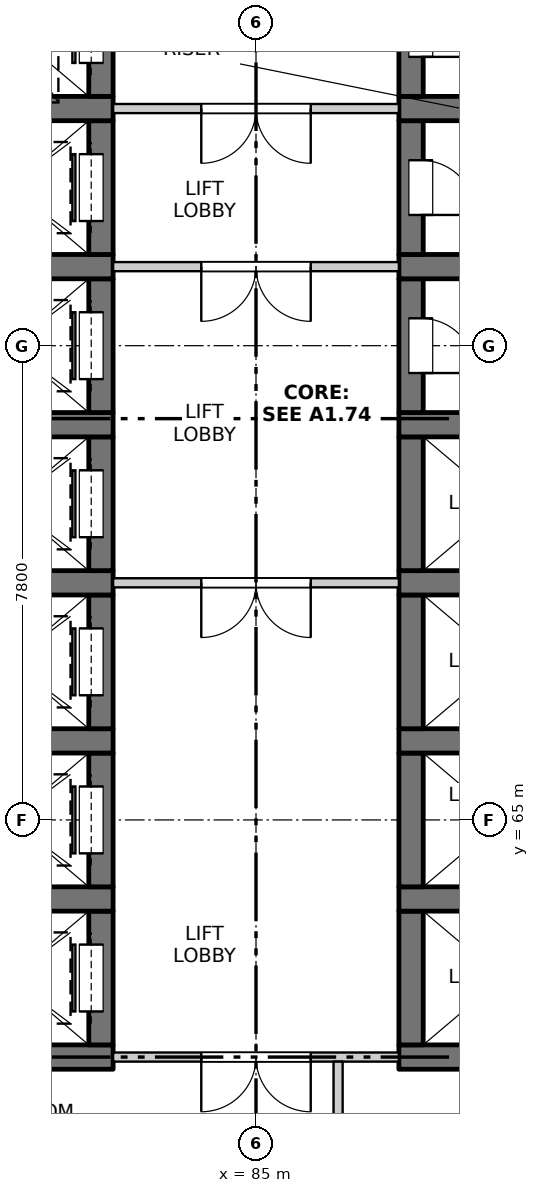
"""IFC4 building model, lengths in metres.
Left out: names, types, materials, properties, quantities, classifications, styles, units other than length and angle.
Written with IfcOpenShell. Run it as: python <this file> out.ifc"""

import sys

from ifc_helpers import new_model, si_unit, direction, frame, frame_2d, origin, place, context, subcontext, project, spatial, rectangle, extrude, element, fill, save


model = new_model("IFC4")
c1 = context("Model", 3, precision=1e-05, world=origin(), true_north=direction((0.0, 1.0)))
c2 = subcontext(c1, "Body", "Model", "MODEL_VIEW")
j1 = project(units=[si_unit("LENGTHUNIT", "METRE"), si_unit("PLANEANGLEUNIT", "RADIAN")], contexts=[c1])
p1 = place(None, origin())
s1 = spatial("IfcSite", under=j1, at=p1, CompositionType="ELEMENT")
p2 = place(p1, origin())
s2 = spatial("IfcBuilding", under=s1, at=p2, CompositionType="ELEMENT")
p3 = place(p2, frame((0.0, 0.0, 29.7)))
s3 = spatial("IfcBuildingStorey", under=s2, at=p3, CompositionType="ELEMENT", Elevation=29.7)
p4 = place(p3, frame((79.65, 61.1, -0.25), z_axis=(0.0, 0.0, 1.0), x_axis=(1.0, 0.0, 0.0)))
e1 = element("IfcWall", 1, at=p4, inside=s3, PredefinedType="SOLIDWALL", context=c2, shape_type="SweptSolid", body=[
    extrude(rectangle(XDim=3.0, YDim=0.4, at=frame_2d((1.5, 0.0))), origin(), (0.0, 0.0, 1.0), 3.4),
])
p5 = place(p3, frame((82.45, 61.3, -0.25), z_axis=(0.0, 0.0, 1.0), x_axis=(0.0, 1.0, 0.0)))
e2 = element("IfcWall", 2, at=p5, inside=s3, PredefinedType="SOLIDWALL", context=c2, shape_type="SweptSolid", body=[
    extrude(rectangle(XDim=2.2, YDim=0.4, at=frame_2d((1.1, 0.0))), origin(), (0.0, 0.0, 1.0), 3.4),
])
p6 = place(p5, frame((0.55, 0.0, 0.25)))
e3 = element("IfcOpeningElement", 3, at=p6, cuts=e2, PredefinedType="OPENING", context=c2, shape_type="SweptSolid", body=[
    extrude(rectangle(XDim=1.1, YDim=2.1, at=frame_2d((0.55, 1.05))), frame((0.0, 0.21, 0.0), z_axis=(0.0, -1.0, 0.0), x_axis=(1.0, 0.0, 0.0)), (0.0, 0.0, 1.0), 0.42),
])
p7 = place(p3, frame((79.65, 63.7, -0.25), z_axis=(0.0, 0.0, 1.0), x_axis=(1.0, 0.0, 0.0)))
e4 = element("IfcWall", 4, at=p7, inside=s3, PredefinedType="SOLIDWALL", context=c2, shape_type="SweptSolid", body=[
    extrude(rectangle(XDim=3.0, YDim=0.4, at=frame_2d((1.5, 0.0))), origin(), (0.0, 0.0, 1.0), 3.4),
])
p8 = place(p3, frame((82.45, 63.9, -0.25), z_axis=(0.0, 0.0, 1.0), x_axis=(0.0, 1.0, 0.0)))
e5 = element("IfcWall", 5, at=p8, inside=s3, PredefinedType="SOLIDWALL", context=c2, shape_type="SweptSolid", body=[
    extrude(rectangle(XDim=2.2, YDim=0.4, at=frame_2d((1.1, 0.0))), origin(), (0.0, 0.0, 1.0), 3.4),
])
p9 = place(p8, frame((0.55, 0.0, 0.25)))
e6 = element("IfcOpeningElement", 6, at=p9, cuts=e5, PredefinedType="OPENING", context=c2, shape_type="SweptSolid", body=[
    extrude(rectangle(XDim=1.1, YDim=2.1, at=frame_2d((0.55, 1.05))), frame((0.0, 0.21, 0.0), z_axis=(0.0, -1.0, 0.0), x_axis=(1.0, 0.0, 0.0)), (0.0, 0.0, 1.0), 0.42),
])
p10 = place(p3, frame((79.65, 66.3, -0.25), z_axis=(0.0, 0.0, 1.0), x_axis=(1.0, 0.0, 0.0)))
e7 = element("IfcWall", 7, at=p10, inside=s3, PredefinedType="SOLIDWALL", context=c2, shape_type="SweptSolid", body=[
    extrude(rectangle(XDim=3.0, YDim=0.4, at=frame_2d((1.5, 0.0))), origin(), (0.0, 0.0, 1.0), 3.4),
])
p11 = place(p3, frame((82.45, 66.5, -0.25), z_axis=(0.0, 0.0, 1.0), x_axis=(0.0, 1.0, 0.0)))
e8 = element("IfcWall", 8, at=p11, inside=s3, PredefinedType="SOLIDWALL", context=c2, shape_type="SweptSolid", body=[
    extrude(rectangle(XDim=2.2, YDim=0.4, at=frame_2d((1.1, 0.0))), origin(), (0.0, 0.0, 1.0), 3.4),
])
p12 = place(p11, frame((0.55, 0.0, 0.25)))
e9 = element("IfcOpeningElement", 9, at=p12, cuts=e8, PredefinedType="OPENING", context=c2, shape_type="SweptSolid", body=[
    extrude(rectangle(XDim=1.1, YDim=2.1, at=frame_2d((0.55, 1.05))), frame((0.0, 0.21, 0.0), z_axis=(0.0, -1.0, 0.0), x_axis=(1.0, 0.0, 0.0)), (0.0, 0.0, 1.0), 0.42),
])
p13 = place(p3, frame((79.65, 68.9, -0.25), z_axis=(0.0, 0.0, 1.0), x_axis=(1.0, 0.0, 0.0)))
e10 = element("IfcWall", 10, at=p13, inside=s3, PredefinedType="SOLIDWALL", context=c2, shape_type="SweptSolid", body=[
    extrude(rectangle(XDim=3.0, YDim=0.4, at=frame_2d((1.5, 0.0))), origin(), (0.0, 0.0, 1.0), 3.4),
])
p14 = place(p3, frame((82.45, 69.1, -0.25), z_axis=(0.0, 0.0, 1.0), x_axis=(0.0, 1.0, 0.0)))
e11 = element("IfcWall", 11, at=p14, inside=s3, PredefinedType="SOLIDWALL", context=c2, shape_type="SweptSolid", body=[
    extrude(rectangle(XDim=2.2, YDim=0.4, at=frame_2d((1.1, 0.0))), origin(), (0.0, 0.0, 1.0), 3.4),
])
p15 = place(p14, frame((0.55, 0.0, 0.25)))
e12 = element("IfcOpeningElement", 12, at=p15, cuts=e11, PredefinedType="OPENING", context=c2, shape_type="SweptSolid", body=[
    extrude(rectangle(XDim=1.1, YDim=2.1, at=frame_2d((0.55, 1.05))), frame((0.0, 0.21, 0.0), z_axis=(0.0, -1.0, 0.0), x_axis=(1.0, 0.0, 0.0)), (0.0, 0.0, 1.0), 0.42),
])
p16 = place(p3, frame((79.65, 71.5, -0.25), z_axis=(0.0, 0.0, 1.0), x_axis=(1.0, 0.0, 0.0)))
e13 = element("IfcWall", 13, at=p16, inside=s3, PredefinedType="SOLIDWALL", context=c2, shape_type="SweptSolid", body=[
    extrude(rectangle(XDim=3.0, YDim=0.4, at=frame_2d((1.5, 0.0))), origin(), (0.0, 0.0, 1.0), 3.4),
])
p17 = place(p3, frame((82.45, 71.7, -0.25), z_axis=(0.0, 0.0, 1.0), x_axis=(0.0, 1.0, 0.0)))
e14 = element("IfcWall", 14, at=p17, inside=s3, PredefinedType="SOLIDWALL", context=c2, shape_type="SweptSolid", body=[
    extrude(rectangle(XDim=2.2, YDim=0.4, at=frame_2d((1.1, 0.0))), origin(), (0.0, 0.0, 1.0), 3.4),
])
p18 = place(p17, frame((0.55, 0.0, 0.25)))
e15 = element("IfcOpeningElement", 15, at=p18, cuts=e14, PredefinedType="OPENING", context=c2, shape_type="SweptSolid", body=[
    extrude(rectangle(XDim=1.1, YDim=2.1, at=frame_2d((0.55, 1.05))), frame((0.0, 0.21, 0.0), z_axis=(0.0, -1.0, 0.0), x_axis=(1.0, 0.0, 0.0)), (0.0, 0.0, 1.0), 0.42),
])
p19 = place(p3, frame((79.65, 74.1, -0.25), z_axis=(0.0, 0.0, 1.0), x_axis=(1.0, 0.0, 0.0)))
e16 = element("IfcWall", 16, at=p19, inside=s3, PredefinedType="SOLIDWALL", context=c2, shape_type="SweptSolid", body=[
    extrude(rectangle(XDim=3.0, YDim=0.4, at=frame_2d((1.5, 0.0))), origin(), (0.0, 0.0, 1.0), 3.4),
])
p20 = place(p3, frame((82.45, 74.3, -0.25), z_axis=(0.0, 0.0, 1.0), x_axis=(0.0, 1.0, 0.0)))
e17 = element("IfcWall", 17, at=p20, inside=s3, PredefinedType="SOLIDWALL", context=c2, shape_type="SweptSolid", body=[
    extrude(rectangle(XDim=2.2, YDim=0.4, at=frame_2d((1.1, 0.0))), origin(), (0.0, 0.0, 1.0), 3.4),
])
p21 = place(p20, frame((0.55, 0.0, 0.25)))
e18 = element("IfcOpeningElement", 18, at=p21, cuts=e17, PredefinedType="OPENING", context=c2, shape_type="SweptSolid", body=[
    extrude(rectangle(XDim=1.1, YDim=2.1, at=frame_2d((0.55, 1.05))), frame((0.0, 0.21, 0.0), z_axis=(0.0, -1.0, 0.0), x_axis=(1.0, 0.0, 0.0)), (0.0, 0.0, 1.0), 0.42),
])
p22 = place(p3, frame((79.65, 76.7, -0.25), z_axis=(0.0, 0.0, 1.0), x_axis=(1.0, 0.0, 0.0)))
e19 = element("IfcWall", 19, at=p22, inside=s3, PredefinedType="SOLIDWALL", context=c2, shape_type="SweptSolid", body=[
    extrude(rectangle(XDim=3.0, YDim=0.4, at=frame_2d((1.5, 0.0))), origin(), (0.0, 0.0, 1.0), 3.4),
])
p23 = place(p3, frame((82.45, 76.9, -0.25), z_axis=(0.0, 0.0, 1.0), x_axis=(0.0, 1.0, 0.0)))
e20 = element("IfcWall", 20, at=p23, inside=s3, PredefinedType="SOLIDWALL", context=c2, shape_type="SweptSolid", body=[
    extrude(rectangle(XDim=2.2, YDim=0.4, at=frame_2d((1.1, 0.0))), origin(), (0.0, 0.0, 1.0), 3.4),
])
p24 = place(p23, frame((0.55, 0.0, 0.25)))
e21 = element("IfcOpeningElement", 21, at=p24, cuts=e20, PredefinedType="OPENING", context=c2, shape_type="SweptSolid", body=[
    extrude(rectangle(XDim=1.1, YDim=2.1, at=frame_2d((0.55, 1.05))), frame((0.0, 0.21, 0.0), z_axis=(0.0, -1.0, 0.0), x_axis=(1.0, 0.0, 0.0)), (0.0, 0.0, 1.0), 0.42),
])
p25 = place(p3, frame((87.35, 61.1, -0.25), z_axis=(0.0, 0.0, 1.0), x_axis=(1.0, 0.0, 0.0)))
e22 = element("IfcWall", 22, at=p25, inside=s3, PredefinedType="SOLIDWALL", context=c2, shape_type="SweptSolid", body=[
    extrude(rectangle(XDim=3.0, YDim=0.4, at=frame_2d((1.5, 0.0))), origin(), (0.0, 0.0, 1.0), 3.4),
])
p26 = place(p3, frame((87.55, 61.3, -0.25), z_axis=(0.0, 0.0, 1.0), x_axis=(0.0, 1.0, 0.0)))
e23 = element("IfcWall", 23, at=p26, inside=s3, PredefinedType="SOLIDWALL", context=c2, shape_type="SweptSolid", body=[
    extrude(rectangle(XDim=2.2, YDim=0.4, at=frame_2d((1.1, 0.0))), origin(), (0.0, 0.0, 1.0), 3.4),
])
p27 = place(p3, frame((87.35, 63.7, -0.25), z_axis=(0.0, 0.0, 1.0), x_axis=(1.0, 0.0, 0.0)))
e24 = element("IfcWall", 24, at=p27, inside=s3, PredefinedType="SOLIDWALL", context=c2, shape_type="SweptSolid", body=[
    extrude(rectangle(XDim=3.0, YDim=0.4, at=frame_2d((1.5, 0.0))), origin(), (0.0, 0.0, 1.0), 3.4),
])
p28 = place(p3, frame((87.55, 63.9, -0.25), z_axis=(0.0, 0.0, 1.0), x_axis=(0.0, 1.0, 0.0)))
e25 = element("IfcWall", 25, at=p28, inside=s3, PredefinedType="SOLIDWALL", context=c2, shape_type="SweptSolid", body=[
    extrude(rectangle(XDim=2.2, YDim=0.4, at=frame_2d((1.1, 0.0))), origin(), (0.0, 0.0, 1.0), 3.4),
])
p29 = place(p3, frame((87.35, 66.3, -0.25), z_axis=(0.0, 0.0, 1.0), x_axis=(1.0, 0.0, 0.0)))
e26 = element("IfcWall", 26, at=p29, inside=s3, PredefinedType="SOLIDWALL", context=c2, shape_type="SweptSolid", body=[
    extrude(rectangle(XDim=3.0, YDim=0.4, at=frame_2d((1.5, 0.0))), origin(), (0.0, 0.0, 1.0), 3.4),
])
p30 = place(p3, frame((87.55, 66.5, -0.25), z_axis=(0.0, 0.0, 1.0), x_axis=(0.0, 1.0, 0.0)))
e27 = element("IfcWall", 27, at=p30, inside=s3, PredefinedType="SOLIDWALL", context=c2, shape_type="SweptSolid", body=[
    extrude(rectangle(XDim=2.2, YDim=0.4, at=frame_2d((1.1, 0.0))), origin(), (0.0, 0.0, 1.0), 3.4),
])
p31 = place(p3, frame((87.35, 68.9, -0.25), z_axis=(0.0, 0.0, 1.0), x_axis=(1.0, 0.0, 0.0)))
e28 = element("IfcWall", 28, at=p31, inside=s3, PredefinedType="SOLIDWALL", context=c2, shape_type="SweptSolid", body=[
    extrude(rectangle(XDim=3.0, YDim=0.4, at=frame_2d((1.5, 0.0))), origin(), (0.0, 0.0, 1.0), 3.4),
])
p32 = place(p3, frame((87.55, 69.1, -0.25), z_axis=(0.0, 0.0, 1.0), x_axis=(0.0, 1.0, 0.0)))
e29 = element("IfcWall", 29, at=p32, inside=s3, PredefinedType="SOLIDWALL", context=c2, shape_type="SweptSolid", body=[
    extrude(rectangle(XDim=2.2, YDim=0.4, at=frame_2d((1.1, 0.0))), origin(), (0.0, 0.0, 1.0), 3.4),
])
p33 = place(p3, frame((87.35, 71.5, -0.25), z_axis=(0.0, 0.0, 1.0), x_axis=(1.0, 0.0, 0.0)))
e30 = element("IfcWall", 30, at=p33, inside=s3, PredefinedType="SOLIDWALL", context=c2, shape_type="SweptSolid", body=[
    extrude(rectangle(XDim=3.0, YDim=0.4, at=frame_2d((1.5, 0.0))), origin(), (0.0, 0.0, 1.0), 3.4),
])
p34 = place(p3, frame((87.55, 71.7, -0.25), z_axis=(0.0, 0.0, 1.0), x_axis=(0.0, 1.0, 0.0)))
e31 = element("IfcWall", 31, at=p34, inside=s3, PredefinedType="SOLIDWALL", context=c2, shape_type="SweptSolid", body=[
    extrude(rectangle(XDim=2.2, YDim=0.4, at=frame_2d((1.1, 0.0))), origin(), (0.0, 0.0, 1.0), 3.4),
])
p35 = place(p34, frame((0.65, 0.0, 0.25)))
e32 = element("IfcOpeningElement", 32, at=p35, cuts=e31, PredefinedType="OPENING", context=c2, shape_type="SweptSolid", body=[
    extrude(rectangle(XDim=0.9, YDim=2.1, at=frame_2d((0.45, 1.05))), frame((0.0, 0.21, 0.0), z_axis=(0.0, -1.0, 0.0), x_axis=(1.0, 0.0, 0.0)), (0.0, 0.0, 1.0), 0.42),
])
p36 = place(p3, frame((87.35, 74.1, -0.25), z_axis=(0.0, 0.0, 1.0), x_axis=(1.0, 0.0, 0.0)))
e33 = element("IfcWall", 33, at=p36, inside=s3, PredefinedType="SOLIDWALL", context=c2, shape_type="SweptSolid", body=[
    extrude(rectangle(XDim=3.0, YDim=0.4, at=frame_2d((1.5, 0.0))), origin(), (0.0, 0.0, 1.0), 3.4),
])
p37 = place(p3, frame((87.55, 74.3, -0.25), z_axis=(0.0, 0.0, 1.0), x_axis=(0.0, 1.0, 0.0)))
e34 = element("IfcWall", 34, at=p37, inside=s3, PredefinedType="SOLIDWALL", context=c2, shape_type="SweptSolid", body=[
    extrude(rectangle(XDim=2.2, YDim=0.4, at=frame_2d((1.1, 0.0))), origin(), (0.0, 0.0, 1.0), 3.4),
])
p38 = place(p37, frame((0.65, 0.0, 0.25)))
e35 = element("IfcOpeningElement", 35, at=p38, cuts=e34, PredefinedType="OPENING", context=c2, shape_type="SweptSolid", body=[
    extrude(rectangle(XDim=0.9, YDim=2.1, at=frame_2d((0.45, 1.05))), frame((0.0, 0.21, 0.0), z_axis=(0.0, -1.0, 0.0), x_axis=(1.0, 0.0, 0.0)), (0.0, 0.0, 1.0), 0.42),
])
p39 = place(p3, frame((87.35, 76.7, -0.25), z_axis=(0.0, 0.0, 1.0), x_axis=(1.0, 0.0, 0.0)))
e36 = element("IfcWall", 36, at=p39, inside=s3, PredefinedType="SOLIDWALL", context=c2, shape_type="SweptSolid", body=[
    extrude(rectangle(XDim=3.0, YDim=0.4, at=frame_2d((1.5, 0.0))), origin(), (0.0, 0.0, 1.0), 3.4),
])
p40 = place(p3, frame((87.55, 76.9, -0.25), z_axis=(0.0, 0.0, 1.0), x_axis=(0.0, 1.0, 0.0)))
e37 = element("IfcWall", 37, at=p40, inside=s3, PredefinedType="SOLIDWALL", context=c2, shape_type="SweptSolid", body=[
    extrude(rectangle(XDim=2.2, YDim=0.4, at=frame_2d((1.1, 0.0))), origin(), (0.0, 0.0, 1.0), 3.4),
])
p41 = place(p40, frame((0.65, 0.0, 0.25)))
e38 = element("IfcOpeningElement", 38, at=p41, cuts=e37, PredefinedType="OPENING", context=c2, shape_type="SweptSolid", body=[
    extrude(rectangle(XDim=0.9, YDim=2.1, at=frame_2d((0.45, 1.05))), frame((0.0, 0.21, 0.0), z_axis=(0.0, -1.0, 0.0), x_axis=(1.0, 0.0, 0.0)), (0.0, 0.0, 1.0), 0.42),
])
p42 = place(p3, frame((82.65, 61.1, 0.0), z_axis=(0.0, 0.0, 1.0), x_axis=(1.0, 0.0, 0.0)))
e39 = element("IfcWall", 39, at=p42, inside=s3, PredefinedType="PARTITIONING", context=c2, shape_type="SweptSolid", body=[
    extrude(rectangle(XDim=4.7, YDim=0.15, at=frame_2d((2.35, 0.0))), origin(), (0.0, 0.0, 1.0), 3.15),
])
p43 = place(p42, frame((1.45, 0.0, 0.0)))
e40 = element("IfcOpeningElement", 40, at=p43, cuts=e39, PredefinedType="OPENING", context=c2, shape_type="SweptSolid", body=[
    extrude(rectangle(XDim=1.8, YDim=2.1, at=frame_2d((0.9, 1.05))), frame((0.0, 0.085, 0.0), z_axis=(0.0, -1.0, 0.0), x_axis=(1.0, 0.0, 0.0)), (0.0, 0.0, 1.0), 0.17),
])
p44 = place(p3, frame((82.65, 68.9, 0.0), z_axis=(0.0, 0.0, 1.0), x_axis=(1.0, 0.0, 0.0)))
e41 = element("IfcWall", 41, at=p44, inside=s3, PredefinedType="PARTITIONING", context=c2, shape_type="SweptSolid", body=[
    extrude(rectangle(XDim=4.7, YDim=0.15, at=frame_2d((2.35, 0.0))), origin(), (0.0, 0.0, 1.0), 3.15),
])
p45 = place(p44, frame((1.45, 0.0, 0.0)))
e42 = element("IfcOpeningElement", 42, at=p45, cuts=e41, PredefinedType="OPENING", context=c2, shape_type="SweptSolid", body=[
    extrude(rectangle(XDim=1.8, YDim=2.1, at=frame_2d((0.9, 1.05))), frame((0.0, 0.085, 0.0), z_axis=(0.0, -1.0, 0.0), x_axis=(1.0, 0.0, 0.0)), (0.0, 0.0, 1.0), 0.17),
])
p46 = place(p3, frame((82.65, 74.1, 0.0), z_axis=(0.0, 0.0, 1.0), x_axis=(1.0, 0.0, 0.0)))
e43 = element("IfcWall", 43, at=p46, inside=s3, PredefinedType="PARTITIONING", context=c2, shape_type="SweptSolid", body=[
    extrude(rectangle(XDim=4.7, YDim=0.15, at=frame_2d((2.35, 0.0))), origin(), (0.0, 0.0, 1.0), 3.15),
])
p47 = place(p46, frame((1.45, 0.0, 0.0)))
e44 = element("IfcOpeningElement", 44, at=p47, cuts=e43, PredefinedType="OPENING", context=c2, shape_type="SweptSolid", body=[
    extrude(rectangle(XDim=1.8, YDim=2.1, at=frame_2d((0.9, 1.05))), frame((0.0, 0.085, 0.0), z_axis=(0.0, -1.0, 0.0), x_axis=(1.0, 0.0, 0.0)), (0.0, 0.0, 1.0), 0.17),
])
p48 = place(p3, frame((82.65, 76.7, 0.0), z_axis=(0.0, 0.0, 1.0), x_axis=(1.0, 0.0, 0.0)))
e45 = element("IfcWall", 45, at=p48, inside=s3, PredefinedType="PARTITIONING", context=c2, shape_type="SweptSolid", body=[
    extrude(rectangle(XDim=4.7, YDim=0.15, at=frame_2d((2.35, 0.0))), origin(), (0.0, 0.0, 1.0), 3.15),
])
p49 = place(p48, frame((1.45, 0.0, 0.0)))
e46 = element("IfcOpeningElement", 46, at=p49, cuts=e45, PredefinedType="OPENING", context=c2, shape_type="SweptSolid", body=[
    extrude(rectangle(XDim=1.8, YDim=2.1, at=frame_2d((0.9, 1.05))), frame((0.0, 0.085, 0.0), z_axis=(0.0, -1.0, 0.0), x_axis=(1.0, 0.0, 0.0)), (0.0, 0.0, 1.0), 0.17),
])
p50 = place(p3, frame((86.35, 55.6, 0.0), z_axis=(0.0, 0.0, 1.0), x_axis=(0.0, 1.0, 0.0)))
e47 = element("IfcWall", 47, at=p50, inside=s3, PredefinedType="PARTITIONING", context=c2, shape_type="SweptSolid", body=[
    extrude(rectangle(XDim=5.425, YDim=0.15, at=frame_2d((2.712, 0.0))), origin(), (0.0, 0.0, 1.0), 3.15),
])
p51 = place(p50, frame((2.1, 0.0, 0.0)))
e48 = element("IfcOpeningElement", 48, at=p51, cuts=e47, PredefinedType="OPENING", context=c2, shape_type="SweptSolid", body=[
    extrude(rectangle(XDim=0.9, YDim=2.1, at=frame_2d((0.45, 1.05))), frame((0.0, 0.085, 0.0), z_axis=(0.0, -1.0, 0.0), x_axis=(1.0, 0.0, 0.0)), (0.0, 0.0, 1.0), 0.17),
])
p52 = place(p43, origin())
e49 = element("IfcDoor", 49, at=p52, inside=s3, OperationType="DOUBLE_DOOR_SINGLE_SWING", PredefinedType="DOOR", context=c2, shape_type="SweptSolid", body=[
    extrude(rectangle(XDim=1.8, YDim=2.1, at=frame_2d((0.9, 1.05))), frame((0.0, 0.025, 0.0), z_axis=(0.0, -1.0, 0.0), x_axis=(1.0, 0.0, 0.0)), (0.0, 0.0, 1.0), 0.05),
])
fill(e40, e49)
p53 = place(p6, origin())
e50 = element("IfcDoor", 50, at=p53, inside=s3, OperationType="SLIDING_TO_RIGHT", PredefinedType="DOOR", context=c2, shape_type="SweptSolid", body=[
    extrude(rectangle(XDim=1.1, YDim=2.1, at=frame_2d((0.55, 1.05))), frame((0.0, 0.185, 0.0), z_axis=(0.0, -1.0, 0.0), x_axis=(1.0, 0.0, 0.0)), (0.0, 0.0, 1.0), 0.05),
])
fill(e3, e50)
p54 = place(p9, origin())
e51 = element("IfcDoor", 51, at=p54, inside=s3, OperationType="SLIDING_TO_RIGHT", PredefinedType="DOOR", context=c2, shape_type="SweptSolid", body=[
    extrude(rectangle(XDim=1.1, YDim=2.1, at=frame_2d((0.55, 1.05))), frame((0.0, 0.185, 0.0), z_axis=(0.0, -1.0, 0.0), x_axis=(1.0, 0.0, 0.0)), (0.0, 0.0, 1.0), 0.05),
])
fill(e6, e51)
p55 = place(p12, origin())
e52 = element("IfcDoor", 52, at=p55, inside=s3, OperationType="SLIDING_TO_RIGHT", PredefinedType="DOOR", context=c2, shape_type="SweptSolid", body=[
    extrude(rectangle(XDim=1.1, YDim=2.1, at=frame_2d((0.55, 1.05))), frame((0.0, 0.185, 0.0), z_axis=(0.0, -1.0, 0.0), x_axis=(1.0, 0.0, 0.0)), (0.0, 0.0, 1.0), 0.05),
])
fill(e9, e52)
p56 = place(p45, origin())
e53 = element("IfcDoor", 53, at=p56, inside=s3, OperationType="DOUBLE_DOOR_SINGLE_SWING", PredefinedType="DOOR", context=c2, shape_type="SweptSolid", body=[
    extrude(rectangle(XDim=1.8, YDim=2.1, at=frame_2d((0.9, 1.05))), frame((0.0, 0.025, 0.0), z_axis=(0.0, -1.0, 0.0), x_axis=(1.0, 0.0, 0.0)), (0.0, 0.0, 1.0), 0.05),
])
fill(e42, e53)
p57 = place(p15, origin())
e54 = element("IfcDoor", 54, at=p57, inside=s3, OperationType="SLIDING_TO_LEFT", PredefinedType="DOOR", context=c2, shape_type="SweptSolid", body=[
    extrude(rectangle(XDim=1.1, YDim=2.1, at=frame_2d((0.55, 1.05))), frame((0.0, 0.185, 0.0), z_axis=(0.0, -1.0, 0.0), x_axis=(1.0, 0.0, 0.0)), (0.0, 0.0, 1.0), 0.05),
])
fill(e12, e54)
p58 = place(p18, origin())
e55 = element("IfcDoor", 55, at=p58, inside=s3, OperationType="SLIDING_TO_LEFT", PredefinedType="DOOR", context=c2, shape_type="SweptSolid", body=[
    extrude(rectangle(XDim=1.1, YDim=2.1, at=frame_2d((0.55, 1.05))), frame((0.0, 0.185, 0.0), z_axis=(0.0, -1.0, 0.0), x_axis=(1.0, 0.0, 0.0)), (0.0, 0.0, 1.0), 0.05),
])
fill(e15, e55)
p59 = place(p35, origin())
e56 = element("IfcDoor", 56, at=p59, inside=s3, OperationType="SINGLE_SWING_RIGHT", PredefinedType="DOOR", context=c2, shape_type="SweptSolid", body=[
    extrude(rectangle(XDim=0.9, YDim=2.1, at=frame_2d((0.45, 1.05))), frame((0.0, -0.135, 0.0), z_axis=(0.0, -1.0, 0.0), x_axis=(1.0, 0.0, 0.0)), (0.0, 0.0, 1.0), 0.05),
])
fill(e32, e56)
p60 = place(p47, origin())
e57 = element("IfcDoor", 57, at=p60, inside=s3, OperationType="DOUBLE_DOOR_SINGLE_SWING", PredefinedType="DOOR", context=c2, shape_type="SweptSolid", body=[
    extrude(rectangle(XDim=1.8, YDim=2.1, at=frame_2d((0.9, 1.05))), frame((0.0, 0.025, 0.0), z_axis=(0.0, -1.0, 0.0), x_axis=(1.0, 0.0, 0.0)), (0.0, 0.0, 1.0), 0.05),
])
fill(e44, e57)
p61 = place(p21, origin())
e58 = element("IfcDoor", 58, at=p61, inside=s3, OperationType="SLIDING_TO_LEFT", PredefinedType="DOOR", context=c2, shape_type="SweptSolid", body=[
    extrude(rectangle(XDim=1.1, YDim=2.1, at=frame_2d((0.55, 1.05))), frame((0.0, 0.185, 0.0), z_axis=(0.0, -1.0, 0.0), x_axis=(1.0, 0.0, 0.0)), (0.0, 0.0, 1.0), 0.05),
])
fill(e18, e58)
p62 = place(p38, origin())
e59 = element("IfcDoor", 59, at=p62, inside=s3, OperationType="SINGLE_SWING_RIGHT", PredefinedType="DOOR", context=c2, shape_type="SweptSolid", body=[
    extrude(rectangle(XDim=0.9, YDim=2.1, at=frame_2d((0.45, 1.05))), frame((0.0, -0.135, 0.0), z_axis=(0.0, -1.0, 0.0), x_axis=(1.0, 0.0, 0.0)), (0.0, 0.0, 1.0), 0.05),
])
fill(e35, e59)
p63 = place(p49, origin())
e60 = element("IfcDoor", 60, at=p63, inside=s3, OperationType="DOUBLE_DOOR_SINGLE_SWING", PredefinedType="DOOR", context=c2, shape_type="SweptSolid", body=[
    extrude(rectangle(XDim=1.8, YDim=2.1, at=frame_2d((0.9, 1.05))), frame((0.0, 0.025, 0.0), z_axis=(0.0, -1.0, 0.0), x_axis=(1.0, 0.0, 0.0)), (0.0, 0.0, 1.0), 0.05),
])
fill(e46, e60)
p64 = place(p24, origin())
e61 = element("IfcDoor", 61, at=p64, inside=s3, OperationType="SLIDING_TO_LEFT", PredefinedType="DOOR", context=c2, shape_type="SweptSolid", body=[
    extrude(rectangle(XDim=1.1, YDim=2.1, at=frame_2d((0.55, 1.05))), frame((0.0, 0.185, 0.0), z_axis=(0.0, -1.0, 0.0), x_axis=(1.0, 0.0, 0.0)), (0.0, 0.0, 1.0), 0.05),
])
fill(e21, e61)
p65 = place(p41, origin())
e62 = element("IfcDoor", 62, at=p65, inside=s3, OperationType="SINGLE_SWING_RIGHT", PredefinedType="DOOR", context=c2, shape_type="SweptSolid", body=[
    extrude(rectangle(XDim=0.9, YDim=2.1, at=frame_2d((0.45, 1.05))), frame((0.0, -0.135, 0.0), z_axis=(0.0, -1.0, 0.0), x_axis=(1.0, 0.0, 0.0)), (0.0, 0.0, 1.0), 0.05),
])
fill(e38, e62)
save(model, sys.argv[1])
